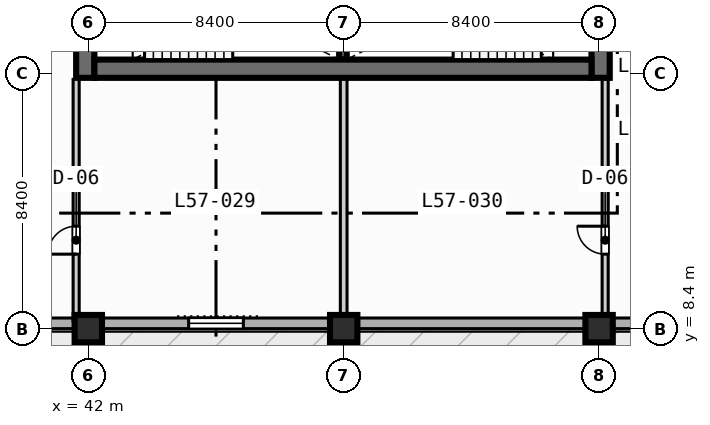
"""IFC4 building model, lengths in metres.
Left out: names, types, materials, properties, quantities, classifications, styles, units other than length and angle.
Written with IfcOpenShell. Run it as: python <this file> out.ifc"""

import sys

from ifc_helpers import new_model, si_unit, direction, frame, frame_2d, origin, origin_2d, place, context, subcontext, project, spatial, rectangle, extrude, element, fill, save


model = new_model("IFC4")
c1 = context("Model", 3, precision=1e-05, world=origin(), true_north=direction((0.0, 1.0)))
c2 = subcontext(c1, "Body", "Model", "MODEL_VIEW")
j1 = project(units=[si_unit("LENGTHUNIT", "METRE"), si_unit("PLANEANGLEUNIT", "RADIAN")], contexts=[c1])
p1 = place(None, origin())
s1 = spatial("IfcSite", under=j1, at=p1, CompositionType="ELEMENT")
p2 = place(p1, origin())
s2 = spatial("IfcBuilding", under=s1, at=p2, CompositionType="ELEMENT")
p3 = place(p2, frame((0.0, 0.0, 234.2)))
s3 = spatial("IfcBuildingStorey", under=s2, at=p3, CompositionType="ELEMENT", Elevation=234.2)
p4 = place(p3, frame((50.375, 17.25, 0.0), z_axis=(0.0, 0.0, 1.0), x_axis=(0.0, 1.0, 0.0)))
e1 = element("IfcWall", 1, at=p4, inside=s3, PredefinedType="SOLIDWALL", context=c2, shape_type="SweptSolid", body=[
    extrude(rectangle(XDim=3.5, YDim=0.25, at=frame_2d((1.75, 0.0))), origin(), (0.0, 0.0, 1.0), 3.47),
])
for number, where, z_axis, x_axis in (
    (2, (41.9, 16.65, 0.0), (0.0, 0.0, 1.0), (0.0, 1.0, 0.0)),
    (3, (58.85, 16.65, 0.0), (0.0, 0.0, 1.0), (0.0, 1.0, 0.0)),
):
    element("IfcWall", number, at=place(p3, frame(where, z_axis=z_axis, x_axis=x_axis)), inside=s3, PredefinedType="SHEAR", context=c2, shape_type="SweptSolid", body=[
        extrude(rectangle(XDim=1.35, YDim=0.6, at=frame_2d((0.675, 0.0))), origin(), (0.0, 0.0, 1.0), 3.47),
    ])
p5 = place(p3, frame((42.2, 16.95, 0.0), z_axis=(0.0, 0.0, 1.0), x_axis=(1.0, 0.0, 0.0)))
e4 = element("IfcWall", 4, at=p5, inside=s3, PredefinedType="SHEAR", context=c2, shape_type="SweptSolid", body=[
    extrude(rectangle(XDim=16.35, YDim=0.6, at=frame_2d((8.175, 0.0))), origin(), (0.0, 0.0, 1.0), 3.47),
])
for number, where, z_axis, x_axis in (
    (5, (42.0, 8.4, 0.0), (0.0, 0.0, 1.0), (1.0, 0.0, 0.0)),
    (6, (50.4, 8.4, 0.0), (0.0, 0.0, 1.0), (1.0, 0.0, 0.0)),
    (7, (58.8, 8.4, 0.0), (0.0, 0.0, 1.0), (1.0, 0.0, 0.0)),
):
    element("IfcColumn", number, at=place(p3, frame(where, z_axis=z_axis, x_axis=x_axis)), inside=s3, PredefinedType="COLUMN", context=c2, shape_type="SweptSolid", body=[
        extrude(rectangle(XDim=0.9, YDim=0.9, at=origin_2d()), origin(), (0.0, 0.0, 1.0), 3.7),
    ])
p6 = place(p3, frame((72.425, 8.575, 0.0), z_axis=(0.0, 0.0, 1.0), x_axis=(-1.0, 0.0, 0.0)))
e8 = element("IfcWall", 8, at=p6, inside=s3, PredefinedType="STANDARD", context=c2, shape_type="SweptSolid", body=[
    extrude(rectangle(XDim=60.85, YDim=0.35, at=frame_2d((30.425, 0.0))), origin(), (0.0, 0.0, 1.0), 3.47),
])
p7 = place(p6, frame((43.325, 0.0, 0.0)))
e9 = element("IfcOpeningElement", 9, at=p7, cuts=e8, PredefinedType="OPENING", context=c2, shape_type="SweptSolid", body=[
    extrude(rectangle(XDim=1.4, YDim=2.2, at=frame_2d((0.7, 1.1))), frame((0.0, 0.185, 0.0), z_axis=(0.0, -1.0, 0.0), x_axis=(1.0, 0.0, 0.0)), (0.0, 0.0, 1.0), 0.37),
])
p8 = place(p6, frame((33.425, 0.0, 0.85)))
e10 = element("IfcOpeningElement", 10, at=p8, cuts=e8, PredefinedType="OPENING", context=c2, shape_type="SweptSolid", body=[
    extrude(rectangle(XDim=2.4, YDim=1.95, at=frame_2d((1.2, 0.975))), frame((0.0, 0.185, 0.0), z_axis=(0.0, -1.0, 0.0), x_axis=(1.0, 0.0, 0.0)), (0.0, 0.0, 1.0), 0.37),
])
p9 = place(p6, frame((25.325, 0.0, 0.85)))
e11 = element("IfcOpeningElement", 11, at=p9, cuts=e8, PredefinedType="OPENING", context=c2, shape_type="SweptSolid", body=[
    extrude(rectangle(XDim=1.8, YDim=1.8, at=frame_2d((0.9, 0.9))), frame((0.0, 0.185, 0.0), z_axis=(0.0, -1.0, 0.0), x_axis=(1.0, 0.0, 0.0)), (0.0, 0.0, 1.0), 0.37),
])
p10 = place(p6, frame((56.325, 0.0, 0.85)))
e12 = element("IfcOpeningElement", 12, at=p10, cuts=e8, PredefinedType="OPENING", context=c2, shape_type="SweptSolid", body=[
    extrude(rectangle(XDim=1.8, YDim=1.8, at=frame_2d((0.9, 0.9))), frame((0.0, 0.185, 0.0), z_axis=(0.0, -1.0, 0.0), x_axis=(1.0, 0.0, 0.0)), (0.0, 0.0, 1.0), 0.37),
])
p11 = place(p3, frame((41.6, 8.65, 0.0), z_axis=(0.0, 0.0, 1.0), x_axis=(0.0, 1.0, 0.0)))
e13 = element("IfcWall", 13, at=p11, inside=s3, PredefinedType="PARTITIONING", context=c2, shape_type="SweptSolid", body=[
    extrude(rectangle(XDim=7.95, YDim=0.2, at=frame_2d((3.975, 0.0))), origin(), (0.0, 0.0, 1.0), 3.47),
])
p12 = place(p11, frame((2.2, 0.0, 0.0)))
e14 = element("IfcOpeningElement", 14, at=p12, cuts=e13, PredefinedType="OPENING", context=c2, shape_type="SweptSolid", body=[
    extrude(rectangle(XDim=0.92, YDim=2.1, at=frame_2d((0.46, 1.05))), frame((0.0, 0.11, 0.0), z_axis=(0.0, -1.0, 0.0), x_axis=(1.0, 0.0, 0.0)), (0.0, 0.0, 1.0), 0.22),
])
p13 = place(p3, frame((59.0, 8.65, 0.0), z_axis=(0.0, 0.0, 1.0), x_axis=(0.0, 1.0, 0.0)))
e15 = element("IfcWall", 15, at=p13, inside=s3, PredefinedType="PARTITIONING", context=c2, shape_type="SweptSolid", body=[
    extrude(rectangle(XDim=7.95, YDim=0.2, at=frame_2d((3.975, 0.0))), origin(), (0.0, 0.0, 1.0), 2.82),
])
p14 = place(p13, frame((2.2, 0.0, 0.0)))
e16 = element("IfcOpeningElement", 16, at=p14, cuts=e15, PredefinedType="OPENING", context=c2, shape_type="SweptSolid", body=[
    extrude(rectangle(XDim=0.92, YDim=2.1, at=frame_2d((0.46, 1.05))), frame((0.0, 0.11, 0.0), z_axis=(0.0, -1.0, 0.0), x_axis=(1.0, 0.0, 0.0)), (0.0, 0.0, 1.0), 0.22),
])
p15 = place(p3, frame((50.4, 8.65, 0.0), z_axis=(0.0, 0.0, 1.0), x_axis=(0.0, 1.0, 0.0)))
e17 = element("IfcWall", 17, at=p15, inside=s3, PredefinedType="PARTITIONING", context=c2, shape_type="SweptSolid", body=[
    extrude(rectangle(XDim=7.95, YDim=0.22, at=frame_2d((3.975, 0.0))), origin(), (0.0, 0.0, 1.0), 3.116),
])
p16 = place(p9, origin())
e18 = element("IfcWindow", 18, at=p16, inside=s3, PartitioningType="SINGLE_PANEL", PredefinedType="WINDOW", context=c2, shape_type="SweptSolid", body=[
    extrude(rectangle(XDim=1.8, YDim=1.8, at=frame_2d((0.9, 0.9))), frame((0.0, 0.03, 0.0), z_axis=(0.0, -1.0, 0.0), x_axis=(1.0, 0.0, 0.0)), (0.0, 0.0, 1.0), 0.06),
])
fill(e11, e18)
p17 = place(p12, origin())
e19 = element("IfcDoor", 19, at=p17, inside=s3, OperationType="SINGLE_SWING_LEFT", PredefinedType="DOOR", context=c2, shape_type="SweptSolid", body=[
    extrude(rectangle(XDim=0.92, YDim=2.1, at=frame_2d((0.46, 1.05))), frame((0.0, 0.025, 0.0), z_axis=(0.0, -1.0, 0.0), x_axis=(1.0, 0.0, 0.0)), (0.0, 0.0, 1.0), 0.05),
])
fill(e14, e19)
p18 = place(p14, origin())
e20 = element("IfcDoor", 20, at=p18, inside=s3, OperationType="SINGLE_SWING_RIGHT", PredefinedType="DOOR", context=c2, shape_type="SweptSolid", body=[
    extrude(rectangle(XDim=0.92, YDim=2.1, at=frame_2d((0.46, 1.05))), frame((0.0, 0.025, 0.0), z_axis=(0.0, -1.0, 0.0), x_axis=(1.0, 0.0, 0.0)), (0.0, 0.0, 1.0), 0.05),
])
fill(e16, e20)
save(model, sys.argv[1])
